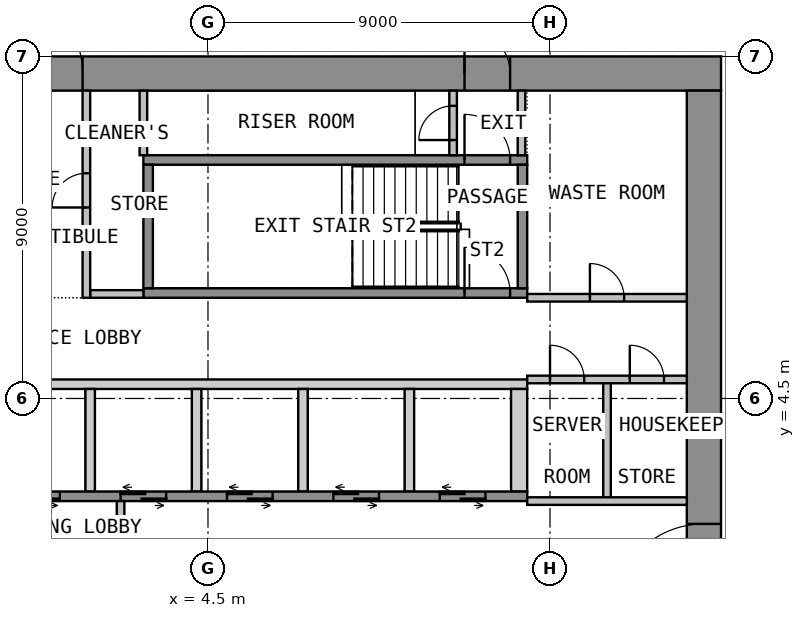
"""IFC4 building model, lengths in metres.
Left out: names, types, materials, properties, quantities, classifications, styles, units other than length and angle.
Written with IfcOpenShell. Run it as: python <this file> out.ifc"""

import sys

from ifc_helpers import new_model, si_unit, direction, frame, frame_2d, origin, place, context, subcontext, project, spatial, polyline, rectangle, outline, extrude, element, fill, save


model = new_model("IFC4")
c1 = context("Model", 3, precision=1e-05, world=origin(), true_north=direction((0.0, 1.0)))
c2 = subcontext(c1, "Body", "Model", "MODEL_VIEW")
j1 = project(units=[si_unit("LENGTHUNIT", "METRE"), si_unit("PLANEANGLEUNIT", "RADIAN")], contexts=[c1])
p1 = place(None, origin())
s1 = spatial("IfcSite", under=j1, at=p1, CompositionType="ELEMENT")
p2 = place(p1, origin())
s2 = spatial("IfcBuilding", under=s1, at=p2, CompositionType="ELEMENT")
p3 = place(p2, frame((0.0, 0.0, 81.3)))
s3 = spatial("IfcBuildingStorey", under=s2, at=p3, CompositionType="ELEMENT", Elevation=81.3)
p4 = place(p3, frame((-18.0, 13.05, 0.0), z_axis=(0.0, 0.0, 1.0), x_axis=(1.0, 0.0, 0.0)))
e1 = element("IfcWall", 1, at=p4, inside=s3, PredefinedType="SHEAR", context=c2, shape_type="SweptSolid", body=[
    extrude(rectangle(XDim=36.0, YDim=0.9, at=frame_2d((18.0, 0.0))), origin(), (0.0, 0.0, 1.0), 3.525),
])
p5 = place(p4, frame((16.8, 0.0, 0.0)))
e2 = element("IfcOpeningElement", 2, at=p5, cuts=e1, PredefinedType="OPENING", context=c2, shape_type="SweptSolid", body=[
    extrude(rectangle(XDim=2.4, YDim=2.1, at=frame_2d((1.2, 1.05))), frame((0.0, 0.46, 0.0), z_axis=(0.0, -1.0, 0.0), x_axis=(1.0, 0.0, 0.0)), (0.0, 0.0, 1.0), 0.92),
])
p6 = place(p4, frame((5.55, 0.0, 0.0)))
e3 = element("IfcOpeningElement", 3, at=p6, cuts=e1, PredefinedType="OPENING", context=c2, shape_type="SweptSolid", body=[
    extrude(rectangle(XDim=1.2, YDim=2.1, at=frame_2d((0.6, 1.05))), frame((0.0, 0.46, 0.0), z_axis=(0.0, -1.0, 0.0), x_axis=(1.0, 0.0, 0.0)), (0.0, 0.0, 1.0), 0.92),
])
p7 = place(p4, frame((29.25, 0.0, 0.0)))
e4 = element("IfcOpeningElement", 4, at=p7, cuts=e1, PredefinedType="OPENING", context=c2, shape_type="SweptSolid", body=[
    extrude(rectangle(XDim=1.2, YDim=2.1, at=frame_2d((0.6, 1.05))), frame((0.0, 0.46, 0.0), z_axis=(0.0, -1.0, 0.0), x_axis=(1.0, 0.0, 0.0)), (0.0, 0.0, 1.0), 0.92),
])
p8 = place(p3, frame((17.55, -12.6, 0.0), z_axis=(0.0, 0.0, 1.0), x_axis=(0.0, 1.0, 0.0)))
e5 = element("IfcWall", 5, at=p8, inside=s3, PredefinedType="SHEAR", context=c2, shape_type="SweptSolid", body=[
    extrude(rectangle(XDim=25.2, YDim=0.9, at=frame_2d((12.6, 0.0))), origin(), (0.0, 0.0, 1.0), 3.525),
])
p9 = place(p8, frame((11.4, 0.0, 0.0)))
e6 = element("IfcOpeningElement", 6, at=p9, cuts=e5, PredefinedType="OPENING", context=c2, shape_type="SweptSolid", body=[
    extrude(rectangle(XDim=2.4, YDim=2.1, at=frame_2d((1.2, 1.05))), frame((0.0, 0.46, 0.0), z_axis=(0.0, -1.0, 0.0), x_axis=(1.0, 0.0, 0.0)), (0.0, 0.0, 1.0), 0.92),
])
p10 = place(p3, origin())
e7 = element("IfcWall", 7, at=p10, inside=s3, PredefinedType="SHEAR", context=c2, shape_type="SweptSolid", body=[
    extrude(outline(polyline([(-12.9, 4.75), (12.9, 4.75), (12.9, 5.0), (-12.9, 5.0), (-12.9, 4.75)])), origin(), (0.0, 0.0, 1.0), 3.525),
])
p11 = place(p3, origin())
e8 = element("IfcWall", 8, at=p11, inside=s3, PredefinedType="SHEAR", context=c2, shape_type="SweptSolid", body=[
    extrude(outline(polyline([(1.275, 2.05), (1.525, 2.05), (1.525, 4.75), (1.275, 4.75), (1.275, 2.05)])), origin(), (0.0, 0.0, 1.0), 3.525),
])
p12 = place(p3, origin())
e9 = element("IfcWall", 9, at=p12, inside=s3, PredefinedType="SHEAR", context=c2, shape_type="SweptSolid", body=[
    extrude(outline(polyline([(4.075, 2.05), (4.325, 2.05), (4.325, 4.75), (4.075, 4.75), (4.075, 2.05)])), origin(), (0.0, 0.0, 1.0), 3.525),
])
p13 = place(p3, origin())
e10 = element("IfcWall", 10, at=p13, inside=s3, PredefinedType="SHEAR", context=c2, shape_type="SweptSolid", body=[
    extrude(outline(polyline([(6.875, 2.05), (7.125, 2.05), (7.125, 4.75), (6.875, 4.75), (6.875, 2.05)])), origin(), (0.0, 0.0, 1.0), 3.525),
])
p14 = place(p3, origin())
e11 = element("IfcWall", 11, at=p14, inside=s3, PredefinedType="SHEAR", context=c2, shape_type="SweptSolid", body=[
    extrude(outline(polyline([(9.675, 2.05), (9.925, 2.05), (9.925, 4.75), (9.675, 4.75), (9.675, 2.05)])), origin(), (0.0, 0.0, 1.0), 3.525),
])
p15 = place(p3, origin())
e12 = element("IfcWall", 12, at=p15, inside=s3, PredefinedType="SHEAR", context=c2, shape_type="SweptSolid", body=[
    extrude(outline(polyline([(12.475, 2.05), (12.9, 2.05), (12.9, 4.75), (12.475, 4.75), (12.475, 2.05)])), origin(), (0.0, 0.0, 1.0), 3.525),
])
p16 = place(p3, frame((-12.9, 1.925, 0.0), z_axis=(0.0, 0.0, 1.0), x_axis=(1.0, 0.0, 0.0)))
e13 = element("IfcWall", 13, at=p16, inside=s3, PredefinedType="SHEAR", context=c2, shape_type="SweptSolid", body=[
    extrude(rectangle(XDim=25.8, YDim=0.25, at=frame_2d((12.9, 0.0))), origin(), (0.0, 0.0, 1.0), 3.525),
])
p17 = place(p16, frame((9.5, 0.0, 0.0)))
e14 = element("IfcOpeningElement", 14, at=p17, cuts=e13, PredefinedType="OPENING", context=c2, shape_type="SweptSolid", body=[
    extrude(rectangle(XDim=1.2, YDim=2.1, at=frame_2d((0.6, 1.05))), frame((0.0, 0.135, 0.0), z_axis=(0.0, -1.0, 0.0), x_axis=(1.0, 0.0, 0.0)), (0.0, 0.0, 1.0), 0.27),
])
p18 = place(p16, frame((12.3, 0.0, 0.0)))
e15 = element("IfcOpeningElement", 15, at=p18, cuts=e13, PredefinedType="OPENING", context=c2, shape_type="SweptSolid", body=[
    extrude(rectangle(XDim=1.2, YDim=2.1, at=frame_2d((0.6, 1.05))), frame((0.0, 0.135, 0.0), z_axis=(0.0, -1.0, 0.0), x_axis=(1.0, 0.0, 0.0)), (0.0, 0.0, 1.0), 0.27),
])
p19 = place(p16, frame((15.1, 0.0, 0.0)))
e16 = element("IfcOpeningElement", 16, at=p19, cuts=e13, PredefinedType="OPENING", context=c2, shape_type="SweptSolid", body=[
    extrude(rectangle(XDim=1.2, YDim=2.1, at=frame_2d((0.6, 1.05))), frame((0.0, 0.135, 0.0), z_axis=(0.0, -1.0, 0.0), x_axis=(1.0, 0.0, 0.0)), (0.0, 0.0, 1.0), 0.27),
])
p20 = place(p16, frame((17.9, 0.0, 0.0)))
e17 = element("IfcOpeningElement", 17, at=p20, cuts=e13, PredefinedType="OPENING", context=c2, shape_type="SweptSolid", body=[
    extrude(rectangle(XDim=1.2, YDim=2.1, at=frame_2d((0.6, 1.05))), frame((0.0, 0.135, 0.0), z_axis=(0.0, -1.0, 0.0), x_axis=(1.0, 0.0, 0.0)), (0.0, 0.0, 1.0), 0.27),
])
p21 = place(p16, frame((20.7, 0.0, 0.0)))
e18 = element("IfcOpeningElement", 18, at=p21, cuts=e13, PredefinedType="OPENING", context=c2, shape_type="SweptSolid", body=[
    extrude(rectangle(XDim=1.2, YDim=2.1, at=frame_2d((0.6, 1.05))), frame((0.0, 0.135, 0.0), z_axis=(0.0, -1.0, 0.0), x_axis=(1.0, 0.0, 0.0)), (0.0, 0.0, 1.0), 0.27),
])
p22 = place(p16, frame((23.5, 0.0, 0.0)))
e19 = element("IfcOpeningElement", 19, at=p22, cuts=e13, PredefinedType="OPENING", context=c2, shape_type="SweptSolid", body=[
    extrude(rectangle(XDim=1.2, YDim=2.1, at=frame_2d((0.6, 1.05))), frame((0.0, 0.135, 0.0), z_axis=(0.0, -1.0, 0.0), x_axis=(1.0, 0.0, 0.0)), (0.0, 0.0, 1.0), 0.27),
])
p23 = place(p3, frame((2.2, -1.8, 0.0), z_axis=(0.0, 0.0, 1.0), x_axis=(0.0, 1.0, 0.0)))
e20 = element("IfcWall", 20, at=p23, inside=s3, PredefinedType="PARTITIONING", context=c2, shape_type="SweptSolid", body=[
    extrude(rectangle(XDim=3.6, YDim=0.2, at=frame_2d((1.8, 0.0))), origin(), (0.0, 0.0, 1.0), 3.525),
])
p24 = place(p23, frame((1.2, 0.0, 0.0)))
e21 = element("IfcOpeningElement", 21, at=p24, cuts=e20, PredefinedType="OPENING", context=c2, shape_type="SweptSolid", body=[
    extrude(rectangle(XDim=1.2, YDim=2.1, at=frame_2d((0.6, 1.05))), frame((0.0, 0.11, 0.0), z_axis=(0.0, -1.0, 0.0), x_axis=(1.0, 0.0, 0.0)), (0.0, 0.0, 1.0), 0.22),
])
p25 = place(p3, frame((2.8, 7.275, 0.0), z_axis=(0.0, 0.0, 1.0), x_axis=(1.0, 0.0, 0.0)))
e22 = element("IfcWall", 22, at=p25, inside=s3, PredefinedType="SHEAR", context=c2, shape_type="SweptSolid", body=[
    extrude(rectangle(XDim=10.1, YDim=0.25, at=frame_2d((5.05, 0.0))), origin(), (0.0, 0.0, 1.0), 3.525),
])
p26 = place(p25, frame((8.45, 0.0, 0.0)))
e23 = element("IfcOpeningElement", 23, at=p26, cuts=e22, PredefinedType="OPENING", context=c2, shape_type="SweptSolid", body=[
    extrude(rectangle(XDim=1.2, YDim=2.1, at=frame_2d((0.6, 1.05))), frame((0.0, 0.135, 0.0), z_axis=(0.0, -1.0, 0.0), x_axis=(1.0, 0.0, 0.0)), (0.0, 0.0, 1.0), 0.27),
])
p27 = place(p3, frame((2.8, 10.775, 0.0), z_axis=(0.0, 0.0, 1.0), x_axis=(1.0, 0.0, 0.0)))
e24 = element("IfcWall", 24, at=p27, inside=s3, PredefinedType="SHEAR", context=c2, shape_type="SweptSolid", body=[
    extrude(rectangle(XDim=10.1, YDim=0.25, at=frame_2d((5.05, 0.0))), origin(), (0.0, 0.0, 1.0), 3.525),
])
p28 = place(p27, frame((8.45, 0.0, 0.0)))
e25 = element("IfcOpeningElement", 25, at=p28, cuts=e24, PredefinedType="OPENING", context=c2, shape_type="SweptSolid", body=[
    extrude(rectangle(XDim=1.2, YDim=2.1, at=frame_2d((0.6, 1.05))), frame((0.0, 0.135, 0.0), z_axis=(0.0, -1.0, 0.0), x_axis=(1.0, 0.0, 0.0)), (0.0, 0.0, 1.0), 0.27),
])
for number, where, z_axis, x_axis in (
    (26, (2.925, 7.4, 0.0), (0.0, 0.0, 1.0), (0.0, 1.0, 0.0)),
    (27, (12.775, 7.4, 0.0), (0.0, 0.0, 1.0), (0.0, 1.0, 0.0)),
):
    element("IfcWall", number, at=place(p3, frame(where, z_axis=z_axis, x_axis=x_axis)), inside=s3, PredefinedType="SHEAR", context=c2, shape_type="SweptSolid", body=[
        extrude(rectangle(XDim=3.25, YDim=0.25, at=frame_2d((1.625, 0.0))), origin(), (0.0, 0.0, 1.0), 3.525),
    ])
p29 = place(p3, frame((1.4, 7.25, 0.0), z_axis=(0.0, 0.0, 1.0), x_axis=(1.0, 0.0, 0.0)))
e28 = element("IfcWall", 28, at=p29, inside=s3, PredefinedType="PARTITIONING", context=c2, shape_type="SweptSolid", body=[
    extrude(rectangle(XDim=1.4, YDim=0.2, at=frame_2d((0.7, 0.0))), origin(), (0.0, 0.0, 1.0), 3.525),
])
p30 = place(p3, frame((1.3, 7.15, 0.0), z_axis=(0.0, 0.0, 1.0), x_axis=(0.0, 1.0, 0.0)))
e29 = element("IfcWall", 29, at=p30, inside=s3, PredefinedType="PARTITIONING", context=c2, shape_type="SweptSolid", body=[
    extrude(rectangle(XDim=5.45, YDim=0.2, at=frame_2d((2.725, 0.0))), origin(), (0.0, 0.0, 1.0), 3.525),
])
p31 = place(p30, frame((2.375, 0.0, 0.0)))
e30 = element("IfcOpeningElement", 30, at=p31, cuts=e29, PredefinedType="OPENING", context=c2, shape_type="SweptSolid", body=[
    extrude(rectangle(XDim=0.9, YDim=2.1, at=frame_2d((0.45, 1.05))), frame((0.0, 0.11, 0.0), z_axis=(0.0, -1.0, 0.0), x_axis=(1.0, 0.0, 0.0)), (0.0, 0.0, 1.0), 0.22),
])
p32 = place(p3, frame((12.75, 10.9, 0.0), z_axis=(0.0, 0.0, 1.0), x_axis=(0.0, 1.0, 0.0)))
e31 = element("IfcWall", 31, at=p32, inside=s3, PredefinedType="PARTITIONING", context=c2, shape_type="SweptSolid", body=[
    extrude(rectangle(XDim=1.7, YDim=0.2, at=frame_2d((0.85, 0.0))), origin(), (0.0, 0.0, 1.0), 3.525),
])
p33 = place(p3, frame((10.95, 10.9, 0.0), z_axis=(0.0, 0.0, 1.0), x_axis=(0.0, 1.0, 0.0)))
e32 = element("IfcWall", 32, at=p33, inside=s3, PredefinedType="PARTITIONING", context=c2, shape_type="SweptSolid", body=[
    extrude(rectangle(XDim=1.7, YDim=0.2, at=frame_2d((0.85, 0.0))), origin(), (0.0, 0.0, 1.0), 3.525),
])
p34 = place(p33, frame((0.4, 0.0, 0.0)))
e33 = element("IfcOpeningElement", 33, at=p34, cuts=e32, PredefinedType="OPENING", context=c2, shape_type="SweptSolid", body=[
    extrude(rectangle(XDim=0.9, YDim=2.1, at=frame_2d((0.45, 1.05))), frame((0.0, 0.11, 0.0), z_axis=(0.0, -1.0, 0.0), x_axis=(1.0, 0.0, 0.0)), (0.0, 0.0, 1.0), 0.22),
])
p35 = place(p3, frame((12.9, 7.15, 0.0), z_axis=(0.0, 0.0, 1.0), x_axis=(1.0, 0.0, 0.0)))
e34 = element("IfcWall", 34, at=p35, inside=s3, PredefinedType="PARTITIONING", context=c2, shape_type="SweptSolid", body=[
    extrude(rectangle(XDim=4.2, YDim=0.2, at=frame_2d((2.1, 0.0))), origin(), (0.0, 0.0, 1.0), 3.525),
])
p36 = place(p35, frame((1.65, 0.0, 0.0)))
e35 = element("IfcOpeningElement", 35, at=p36, cuts=e34, PredefinedType="OPENING", context=c2, shape_type="SweptSolid", body=[
    extrude(rectangle(XDim=0.9, YDim=2.1, at=frame_2d((0.45, 1.05))), frame((0.0, 0.11, 0.0), z_axis=(0.0, -1.0, 0.0), x_axis=(1.0, 0.0, 0.0)), (0.0, 0.0, 1.0), 0.22),
])
p37 = place(p3, frame((15.0, 1.8, 0.0), z_axis=(0.0, 0.0, 1.0), x_axis=(0.0, 1.0, 0.0)))
e36 = element("IfcWall", 36, at=p37, inside=s3, PredefinedType="PARTITIONING", context=c2, shape_type="SweptSolid", body=[
    extrude(rectangle(XDim=3.2, YDim=0.2, at=frame_2d((1.6, 0.0))), origin(), (0.0, 0.0, 1.0), 3.525),
])
p38 = place(p3, frame((12.9, 5.0, 0.0), z_axis=(0.0, 0.0, 1.0), x_axis=(1.0, 0.0, 0.0)))
e37 = element("IfcWall", 37, at=p38, inside=s3, PredefinedType="PARTITIONING", context=c2, shape_type="SweptSolid", body=[
    extrude(rectangle(XDim=4.2, YDim=0.2, at=frame_2d((2.1, 0.0))), origin(), (0.0, 0.0, 1.0), 3.525),
])
p39 = place(p38, frame((0.6, 0.0, 0.0)))
e38 = element("IfcOpeningElement", 38, at=p39, cuts=e37, PredefinedType="OPENING", context=c2, shape_type="SweptSolid", body=[
    extrude(rectangle(XDim=0.9, YDim=2.1, at=frame_2d((0.45, 1.05))), frame((0.0, 0.11, 0.0), z_axis=(0.0, -1.0, 0.0), x_axis=(1.0, 0.0, 0.0)), (0.0, 0.0, 1.0), 0.22),
])
p40 = place(p38, frame((2.7, 0.0, 0.0)))
e39 = element("IfcOpeningElement", 39, at=p40, cuts=e37, PredefinedType="OPENING", context=c2, shape_type="SweptSolid", body=[
    extrude(rectangle(XDim=0.9, YDim=2.1, at=frame_2d((0.45, 1.05))), frame((0.0, 0.11, 0.0), z_axis=(0.0, -1.0, 0.0), x_axis=(1.0, 0.0, 0.0)), (0.0, 0.0, 1.0), 0.22),
])
p41 = place(p3, frame((12.9, 1.8, 0.0), z_axis=(0.0, 0.0, 1.0), x_axis=(1.0, 0.0, 0.0)))
e40 = element("IfcWall", 40, at=p41, inside=s3, PredefinedType="PARTITIONING", context=c2, shape_type="SweptSolid", body=[
    extrude(rectangle(XDim=4.2, YDim=0.2, at=frame_2d((2.1, 0.0))), origin(), (0.0, 0.0, 1.0), 3.525),
])
p42 = place(p3, frame((2.8, 12.599, 0.0), z_axis=(0.0, 0.0, 1.0), x_axis=(0.0, -1.0, 0.0)))
e41 = element("IfcWall", 41, at=p42, inside=s3, PredefinedType="PARTITIONING", context=c2, shape_type="SweptSolid", body=[
    extrude(rectangle(XDim=1.698, YDim=0.2, at=frame_2d((0.849, 0.0))), origin(), (0.0, 0.0, 1.0), 3.525),
])
p43 = place(p9, origin())
e42 = element("IfcDoor", 42, at=p43, inside=s3, OperationType="DOUBLE_DOOR_DOUBLE_SWING", PredefinedType="DOOR", context=c2, shape_type="SweptSolid", body=[
    extrude(rectangle(XDim=2.4, YDim=2.1, at=frame_2d((1.2, 1.05))), frame((0.0, 0.025, 0.0), z_axis=(0.0, -1.0, 0.0), x_axis=(1.0, 0.0, 0.0)), (0.0, 0.0, 1.0), 0.05),
])
fill(e6, e42)
p44 = place(p5, origin())
e43 = element("IfcDoor", 43, at=p44, inside=s3, OperationType="DOUBLE_DOOR_DOUBLE_SWING", PredefinedType="DOOR", context=c2, shape_type="SweptSolid", body=[
    extrude(rectangle(XDim=2.4, YDim=2.1, at=frame_2d((1.2, 1.05))), frame((0.0, 0.025, 0.0), z_axis=(0.0, -1.0, 0.0), x_axis=(1.0, 0.0, 0.0)), (0.0, 0.0, 1.0), 0.05),
])
fill(e2, e43)
p45 = place(p7, origin())
e44 = element("IfcDoor", 44, at=p45, inside=s3, OperationType="SINGLE_SWING_RIGHT", PredefinedType="DOOR", context=c2, shape_type="SweptSolid", body=[
    extrude(rectangle(XDim=1.2, YDim=2.1, at=frame_2d((0.6, 1.05))), frame((0.0, 0.025, 0.0), z_axis=(0.0, -1.0, 0.0), x_axis=(1.0, 0.0, 0.0)), (0.0, 0.0, 1.0), 0.05),
])
fill(e4, e44)
p46 = place(p18, origin())
e45 = element("IfcDoor", 45, at=p46, inside=s3, OperationType="DOUBLE_DOOR_SLIDING", PredefinedType="DOOR", context=c2, shape_type="SweptSolid", body=[
    extrude(rectangle(XDim=1.2, YDim=2.1, at=frame_2d((0.6, 1.05))), frame((0.0, 0.025, 0.0), z_axis=(0.0, -1.0, 0.0), x_axis=(1.0, 0.0, 0.0)), (0.0, 0.0, 1.0), 0.05),
])
fill(e15, e45)
p47 = place(p19, origin())
e46 = element("IfcDoor", 46, at=p47, inside=s3, OperationType="DOUBLE_DOOR_SLIDING", PredefinedType="DOOR", context=c2, shape_type="SweptSolid", body=[
    extrude(rectangle(XDim=1.2, YDim=2.1, at=frame_2d((0.6, 1.05))), frame((0.0, 0.025, 0.0), z_axis=(0.0, -1.0, 0.0), x_axis=(1.0, 0.0, 0.0)), (0.0, 0.0, 1.0), 0.05),
])
fill(e16, e46)
p48 = place(p20, origin())
e47 = element("IfcDoor", 47, at=p48, inside=s3, OperationType="DOUBLE_DOOR_SLIDING", PredefinedType="DOOR", context=c2, shape_type="SweptSolid", body=[
    extrude(rectangle(XDim=1.2, YDim=2.1, at=frame_2d((0.6, 1.05))), frame((0.0, 0.025, 0.0), z_axis=(0.0, -1.0, 0.0), x_axis=(1.0, 0.0, 0.0)), (0.0, 0.0, 1.0), 0.05),
])
fill(e17, e47)
p49 = place(p21, origin())
e48 = element("IfcDoor", 48, at=p49, inside=s3, OperationType="DOUBLE_DOOR_SLIDING", PredefinedType="DOOR", context=c2, shape_type="SweptSolid", body=[
    extrude(rectangle(XDim=1.2, YDim=2.1, at=frame_2d((0.6, 1.05))), frame((0.0, 0.025, 0.0), z_axis=(0.0, -1.0, 0.0), x_axis=(1.0, 0.0, 0.0)), (0.0, 0.0, 1.0), 0.05),
])
fill(e18, e48)
p50 = place(p22, origin())
e49 = element("IfcDoor", 49, at=p50, inside=s3, OperationType="DOUBLE_DOOR_SLIDING", PredefinedType="DOOR", context=c2, shape_type="SweptSolid", body=[
    extrude(rectangle(XDim=1.2, YDim=2.1, at=frame_2d((0.6, 1.05))), frame((0.0, 0.025, 0.0), z_axis=(0.0, -1.0, 0.0), x_axis=(1.0, 0.0, 0.0)), (0.0, 0.0, 1.0), 0.05),
])
fill(e19, e49)
p51 = place(p26, origin())
e50 = element("IfcDoor", 50, at=p51, inside=s3, OperationType="SINGLE_SWING_LEFT", PredefinedType="DOOR", context=c2, shape_type="SweptSolid", body=[
    extrude(rectangle(XDim=1.2, YDim=2.1, at=frame_2d((0.6, 1.05))), frame((0.0, 0.025, 0.0), z_axis=(0.0, -1.0, 0.0), x_axis=(1.0, 0.0, 0.0)), (0.0, 0.0, 1.0), 0.05),
])
fill(e23, e50)
p52 = place(p31, origin())
e51 = element("IfcDoor", 51, at=p52, inside=s3, OperationType="SINGLE_SWING_LEFT", PredefinedType="DOOR", context=c2, shape_type="SweptSolid", body=[
    extrude(rectangle(XDim=0.9, YDim=2.1, at=frame_2d((0.45, 1.05))), frame((0.0, 0.025, 0.0), z_axis=(0.0, -1.0, 0.0), x_axis=(1.0, 0.0, 0.0)), (0.0, 0.0, 1.0), 0.05),
])
fill(e30, e51)
p53 = place(p28, origin())
e52 = element("IfcDoor", 52, at=p53, inside=s3, OperationType="SINGLE_SWING_RIGHT", PredefinedType="DOOR", context=c2, shape_type="SweptSolid", body=[
    extrude(rectangle(XDim=1.2, YDim=2.1, at=frame_2d((0.6, 1.05))), frame((0.0, 0.025, 0.0), z_axis=(0.0, -1.0, 0.0), x_axis=(1.0, 0.0, 0.0)), (0.0, 0.0, 1.0), 0.05),
])
fill(e25, e52)
p54 = place(p34, origin())
e53 = element("IfcDoor", 53, at=p54, inside=s3, OperationType="SINGLE_SWING_LEFT", PredefinedType="DOOR", context=c2, shape_type="SweptSolid", body=[
    extrude(rectangle(XDim=0.9, YDim=2.1, at=frame_2d((0.45, 1.05))), frame((0.0, 0.025, 0.0), z_axis=(0.0, -1.0, 0.0), x_axis=(1.0, 0.0, 0.0)), (0.0, 0.0, 1.0), 0.05),
])
fill(e33, e53)
p55 = place(p36, origin())
e54 = element("IfcDoor", 54, at=p55, inside=s3, OperationType="SINGLE_SWING_LEFT", PredefinedType="DOOR", context=c2, shape_type="SweptSolid", body=[
    extrude(rectangle(XDim=0.9, YDim=2.1, at=frame_2d((0.45, 1.05))), frame((0.0, 0.025, 0.0), z_axis=(0.0, -1.0, 0.0), x_axis=(1.0, 0.0, 0.0)), (0.0, 0.0, 1.0), 0.05),
])
fill(e35, e54)
p56 = place(p39, origin())
e55 = element("IfcDoor", 55, at=p56, inside=s3, OperationType="SINGLE_SWING_LEFT", PredefinedType="DOOR", context=c2, shape_type="SweptSolid", body=[
    extrude(rectangle(XDim=0.9, YDim=2.1, at=frame_2d((0.45, 1.05))), frame((0.0, 0.025, 0.0), z_axis=(0.0, -1.0, 0.0), x_axis=(1.0, 0.0, 0.0)), (0.0, 0.0, 1.0), 0.05),
])
fill(e38, e55)
p57 = place(p40, origin())
e56 = element("IfcDoor", 56, at=p57, inside=s3, OperationType="SINGLE_SWING_LEFT", PredefinedType="DOOR", context=c2, shape_type="SweptSolid", body=[
    extrude(rectangle(XDim=0.9, YDim=2.1, at=frame_2d((0.45, 1.05))), frame((0.0, 0.025, 0.0), z_axis=(0.0, -1.0, 0.0), x_axis=(1.0, 0.0, 0.0)), (0.0, 0.0, 1.0), 0.05),
])
fill(e39, e56)
save(model, sys.argv[1])
